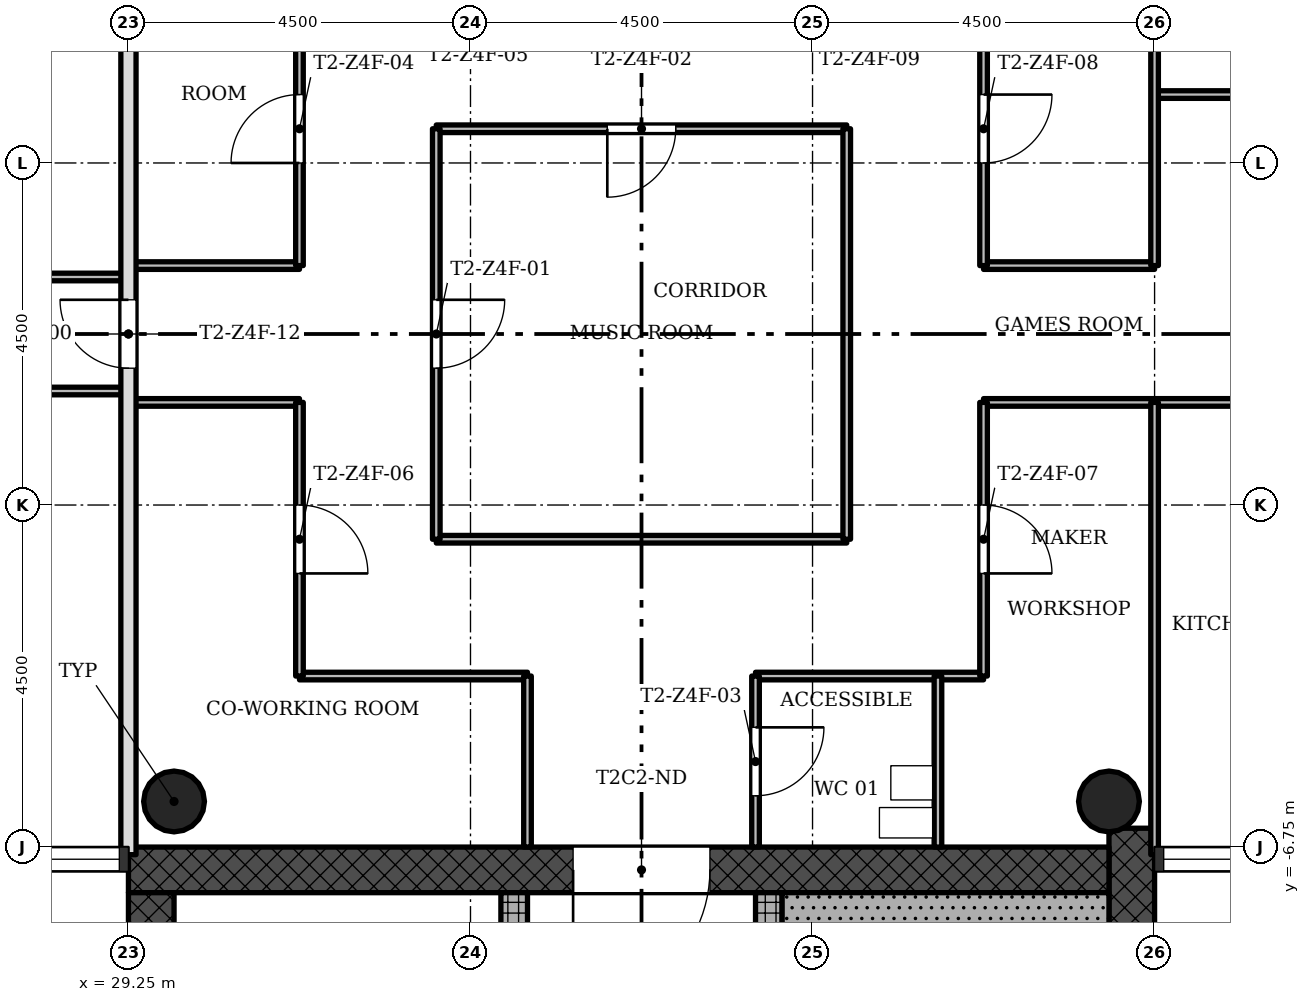
"""IFC4 building model, lengths in metres.
Left out: names, types, materials, properties, quantities, classifications, styles, units other than length and angle.
Written with IfcOpenShell. Run it as: python <this file> out.ifc"""

import sys

from ifc_helpers import new_model, si_unit, direction, frame, frame_2d, origin, origin_2d, place, context, subcontext, project, spatial, rectangle, hollow_circle, extrude, element, fill, save


model = new_model("IFC4")
c1 = context("Model", 3, precision=1e-05, world=origin(), true_north=direction((0.0, 1.0)))
c2 = subcontext(c1, "Body", "Model", "MODEL_VIEW")
j1 = project(units=[si_unit("LENGTHUNIT", "METRE"), si_unit("PLANEANGLEUNIT", "RADIAN")], contexts=[c1])
p1 = place(None, origin())
s1 = spatial("IfcSite", under=j1, at=p1, CompositionType="ELEMENT")
p2 = place(p1, origin())
s2 = spatial("IfcBuilding", under=s1, at=p2, CompositionType="ELEMENT")
p3 = place(p2, frame((0.0, 0.0, 216.4)))
s3 = spatial("IfcBuildingStorey", under=s2, at=p3, CompositionType="ELEMENT", Elevation=216.4)
p4 = place(p3, frame((42.45, -15.15, 0.0), z_axis=(0.0, 0.0, 1.0), x_axis=(0.0, 1.0, 0.0)))
e1 = element("IfcWall", 1, at=p4, inside=s3, PredefinedType="SHEAR", context=c2, shape_type="SweptSolid", body=[
    extrude(rectangle(XDim=8.648, YDim=0.6, at=frame_2d((4.324, 0.0))), origin(), (0.0, 0.0, 1.0), 3.4),
])
p5 = place(p3, frame((42.15, -7.05, 0.0), z_axis=(0.0, 0.0, 1.0), x_axis=(-1.0, 0.0, 0.0)))
e2 = element("IfcWall", 2, at=p5, inside=s3, PredefinedType="SHEAR", context=c2, shape_type="SweptSolid", body=[
    extrude(rectangle(XDim=12.9, YDim=0.6, at=frame_2d((6.45, 0.0))), origin(), (0.0, 0.0, 1.0), 3.4),
])
p6 = place(p5, frame((5.25, 0.0, 0.0)))
e3 = element("IfcOpeningElement", 3, at=p6, cuts=e2, PredefinedType="OPENING", context=c2, shape_type="SweptSolid", body=[
    extrude(rectangle(XDim=1.8, YDim=2.1, at=frame_2d((0.9, 1.05))), frame((0.0, 0.31, 0.0), z_axis=(0.0, -1.0, 0.0), x_axis=(1.0, 0.0, 0.0)), (0.0, 0.0, 1.0), 0.62),
])
p7 = place(p3, frame((29.55, -7.35, 0.0), z_axis=(0.0, 0.0, 1.0), x_axis=(0.0, -1.0, 0.0)))
e4 = element("IfcWall", 4, at=p7, inside=s3, PredefinedType="SHEAR", context=c2, shape_type="SweptSolid", body=[
    extrude(rectangle(XDim=8.4, YDim=0.6, at=frame_2d((4.2, 0.0))), origin(), (0.0, 0.0, 1.0), 3.4),
])
p8 = place(p3, frame((34.325, -15.15, 0.0), z_axis=(0.0, 0.0, 1.0), x_axis=(0.0, 1.0, 0.0)))
e5 = element("IfcWall", 5, at=p8, inside=s3, PredefinedType="SHEAR", context=c2, shape_type="SweptSolid", body=[
    extrude(rectangle(XDim=7.8, YDim=0.35, at=frame_2d((3.9, 0.0))), origin(), (0.0, 0.0, 1.0), 3.4),
])
p9 = place(p8, frame((5.55, 0.0, 0.0)))
e6 = element("IfcOpeningElement", 6, at=p9, cuts=e5, PredefinedType="OPENING", context=c2, shape_type="SweptSolid", body=[
    extrude(rectangle(XDim=1.1, YDim=2.1, at=frame_2d((0.55, 1.05))), frame((0.0, 0.185, 0.0), z_axis=(0.0, -1.0, 0.0), x_axis=(1.0, 0.0, 0.0)), (0.0, 0.0, 1.0), 0.37),
])
p10 = place(p8, frame((1.2, 0.0, 0.0)))
e7 = element("IfcOpeningElement", 7, at=p10, cuts=e5, PredefinedType="OPENING", context=c2, shape_type="SweptSolid", body=[
    extrude(rectangle(XDim=1.1, YDim=2.1, at=frame_2d((0.55, 1.05))), frame((0.0, 0.185, 0.0), z_axis=(0.0, -1.0, 0.0), x_axis=(1.0, 0.0, 0.0)), (0.0, 0.0, 1.0), 0.37),
])
p11 = place(p8, frame((3.5, 0.0, 0.0)))
e8 = element("IfcOpeningElement", 8, at=p11, cuts=e5, PredefinedType="OPENING", context=c2, shape_type="SweptSolid", body=[
    extrude(rectangle(XDim=0.9, YDim=2.1, at=frame_2d((0.45, 1.05))), frame((0.0, 0.185, 0.0), z_axis=(0.0, -1.0, 0.0), x_axis=(1.0, 0.0, 0.0)), (0.0, 0.0, 1.0), 0.37),
])
p12 = place(p3, frame((37.675, -15.15, 0.0), z_axis=(0.0, 0.0, 1.0), x_axis=(0.0, 1.0, 0.0)))
e9 = element("IfcWall", 9, at=p12, inside=s3, PredefinedType="SHEAR", context=c2, shape_type="SweptSolid", body=[
    extrude(rectangle(XDim=7.8, YDim=0.35, at=frame_2d((3.9, 0.0))), origin(), (0.0, 0.0, 1.0), 3.4),
])
p13 = place(p12, frame((5.85, 0.0, 0.0)))
e10 = element("IfcOpeningElement", 10, at=p13, cuts=e9, PredefinedType="OPENING", context=c2, shape_type="SweptSolid", body=[
    extrude(rectangle(XDim=0.9, YDim=2.1, at=frame_2d((0.45, 1.05))), frame((0.0, 0.185, 0.0), z_axis=(0.0, -1.0, 0.0), x_axis=(1.0, 0.0, 0.0)), (0.0, 0.0, 1.0), 0.37),
])
for number, where, z_axis, x_axis in (
    (11, (42.15, -6.15, 0.0), (0.0, 0.0, 1.0), (1.0, 0.0, 0.0)),
    (12, (29.85, -6.15, 0.0), (0.0, 0.0, 1.0), (1.0, 0.0, 0.0)),
):
    element("IfcColumn", number, at=place(p3, frame(where, z_axis=z_axis, x_axis=x_axis)), inside=s3, PredefinedType="COLUMN", context=c2, shape_type="SweptSolid", body=[
        extrude(hollow_circle(Radius=0.4, WallThickness=0.028, at=origin_2d()), origin(), (0.0, 0.0, 1.0), 3.4),
    ])
for number, where, z_axis, x_axis in (
    (13, (40.5, -4.5, 0.0), (0.0, 0.0, 1.0), (-1.0, 0.0, 0.0)),
    (14, (34.5, -4.5, 0.0), (0.0, 0.0, 1.0), (-1.0, 0.0, 0.0)),
):
    element("IfcWall", number, at=place(p3, frame(where, z_axis=z_axis, x_axis=x_axis)), inside=s3, PredefinedType="PARTITIONING", context=c2, shape_type="SweptSolid", body=[
        extrude(rectangle(XDim=3.0, YDim=0.1, at=frame_2d((1.5, 0.0))), origin(), (0.0, 0.0, 1.0), 3.0),
    ])
p14 = place(p3, frame((38.7, -2.7, 0.0), z_axis=(0.0, 0.0, 1.0), x_axis=(-1.0, 0.0, 0.0)))
e15 = element("IfcWall", 15, at=p14, inside=s3, PredefinedType="PARTITIONING", context=c2, shape_type="SweptSolid", body=[
    extrude(rectangle(XDim=5.4, YDim=0.1, at=frame_2d((2.7, 0.0))), origin(), (0.0, 0.0, 1.0), 3.0),
])
p15 = place(p3, frame((44.55, -0.9, 0.0), z_axis=(0.0, 0.0, 1.0), x_axis=(-1.0, 0.0, 0.0)))
e16 = element("IfcWall", 16, at=p15, inside=s3, PredefinedType="PARTITIONING", context=c2, shape_type="SweptSolid", body=[
    extrude(rectangle(XDim=4.05, YDim=0.1, at=frame_2d((2.025, 0.0))), origin(), (0.0, 0.0, 1.0), 3.0),
])
p16 = place(p3, frame((31.5, -0.9, 0.0), z_axis=(0.0, 0.0, 1.0), x_axis=(-1.0, 0.0, 0.0)))
e17 = element("IfcWall", 17, at=p16, inside=s3, PredefinedType="PARTITIONING", context=c2, shape_type="SweptSolid", body=[
    extrude(rectangle(XDim=2.25, YDim=0.1, at=frame_2d((1.125, 0.0))), origin(), (0.0, 0.0, 1.0), 3.0),
])
p17 = place(p3, frame((29.25, -0.75, 0.0), z_axis=(0.0, 0.0, 1.0), x_axis=(-1.0, 0.0, 0.0)))
e18 = element("IfcWall", 18, at=p17, inside=s3, PredefinedType="PARTITIONING", context=c2, shape_type="SweptSolid", body=[
    extrude(rectangle(XDim=7.8, YDim=0.1, at=frame_2d((3.9, 0.0))), origin(), (0.0, 0.0, 1.0), 3.0),
])
p18 = place(p17, frame((1.8, 0.0, 0.0)))
e19 = element("IfcOpeningElement", 19, at=p18, cuts=e18, PredefinedType="OPENING", context=c2, shape_type="SweptSolid", body=[
    extrude(rectangle(XDim=0.9, YDim=2.1, at=frame_2d((0.45, 1.05))), frame((0.0, 0.06, 0.0), z_axis=(0.0, -1.0, 0.0), x_axis=(1.0, 0.0, 0.0)), (0.0, 0.0, 1.0), 0.12),
])
p19 = place(p17, frame((4.95, 0.0, 0.0)))
e20 = element("IfcOpeningElement", 20, at=p19, cuts=e18, PredefinedType="OPENING", context=c2, shape_type="SweptSolid", body=[
    extrude(rectangle(XDim=0.9, YDim=2.1, at=frame_2d((0.45, 1.05))), frame((0.0, 0.06, 0.0), z_axis=(0.0, -1.0, 0.0), x_axis=(1.0, 0.0, 0.0)), (0.0, 0.0, 1.0), 0.12),
])
p20 = place(p17, frame((6.6, 0.0, 0.0)))
e21 = element("IfcOpeningElement", 21, at=p20, cuts=e18, PredefinedType="OPENING", context=c2, shape_type="SweptSolid", body=[
    extrude(rectangle(XDim=0.9, YDim=2.1, at=frame_2d((0.45, 1.05))), frame((0.0, 0.06, 0.0), z_axis=(0.0, -1.0, 0.0), x_axis=(1.0, 0.0, 0.0)), (0.0, 0.0, 1.0), 0.12),
])
p21 = place(p3, frame((29.25, 0.75, 0.0), z_axis=(0.0, 0.0, 1.0), x_axis=(-1.0, 0.0, 0.0)))
e22 = element("IfcWall", 22, at=p21, inside=s3, PredefinedType="PARTITIONING", context=c2, shape_type="SweptSolid", body=[
    extrude(rectangle(XDim=4.5, YDim=0.1, at=frame_2d((2.25, 0.0))), origin(), (0.0, 0.0, 1.0), 3.0),
])
p22 = place(p21, frame((1.8, 0.0, 0.0)))
e23 = element("IfcOpeningElement", 23, at=p22, cuts=e22, PredefinedType="OPENING", context=c2, shape_type="SweptSolid", body=[
    extrude(rectangle(XDim=0.9, YDim=2.1, at=frame_2d((0.45, 1.05))), frame((0.0, 0.06, 0.0), z_axis=(0.0, -1.0, 0.0), x_axis=(1.0, 0.0, 0.0)), (0.0, 0.0, 1.0), 0.12),
])
for number, where, z_axis, x_axis in (
    (24, (42.75, 0.9, 0.0), (0.0, 0.0, 1.0), (-1.0, 0.0, 0.0)),
    (25, (31.5, 0.9, 0.0), (0.0, 0.0, 1.0), (-1.0, 0.0, 0.0)),
):
    element("IfcWall", number, at=place(p3, frame(where, z_axis=z_axis, x_axis=x_axis)), inside=s3, PredefinedType="PARTITIONING", context=c2, shape_type="SweptSolid", body=[
        extrude(rectangle(XDim=2.25, YDim=0.1, at=frame_2d((1.125, 0.0))), origin(), (0.0, 0.0, 1.0), 3.0),
    ])
p23 = place(p3, frame((38.7, 2.7, 0.0), z_axis=(0.0, 0.0, 1.0), x_axis=(-1.0, 0.0, 0.0)))
e26 = element("IfcWall", 26, at=p23, inside=s3, PredefinedType="PARTITIONING", context=c2, shape_type="SweptSolid", body=[
    extrude(rectangle(XDim=5.4, YDim=0.1, at=frame_2d((2.7, 0.0))), origin(), (0.0, 0.0, 1.0), 3.0),
])
p24 = place(p23, frame((2.25, 0.0, 0.0)))
e27 = element("IfcOpeningElement", 27, at=p24, cuts=e26, PredefinedType="OPENING", context=c2, shape_type="SweptSolid", body=[
    extrude(rectangle(XDim=0.9, YDim=2.1, at=frame_2d((0.45, 1.05))), frame((0.0, 0.06, 0.0), z_axis=(0.0, -1.0, 0.0), x_axis=(1.0, 0.0, 0.0)), (0.0, 0.0, 1.0), 0.12),
])
p25 = place(p3, frame((47.25, 3.15, 0.0), z_axis=(0.0, 0.0, 1.0), x_axis=(-1.0, 0.0, 0.0)))
e28 = element("IfcWall", 28, at=p25, inside=s3, PredefinedType="PARTITIONING", context=c2, shape_type="SweptSolid", body=[
    extrude(rectangle(XDim=4.5, YDim=0.1, at=frame_2d((2.25, 0.0))), origin(), (0.0, 0.0, 1.0), 3.0),
])
p26 = place(p25, frame((1.8, 0.0, 0.0)))
e29 = element("IfcOpeningElement", 29, at=p26, cuts=e28, PredefinedType="OPENING", context=c2, shape_type="SweptSolid", body=[
    extrude(rectangle(XDim=0.9, YDim=2.1, at=frame_2d((0.45, 1.05))), frame((0.0, 0.06, 0.0), z_axis=(0.0, -1.0, 0.0), x_axis=(1.0, 0.0, 0.0)), (0.0, 0.0, 1.0), 0.12),
])
for number, where, z_axis, x_axis in (
    (30, (42.75, -6.85, 0.0), (0.0, 0.0, 1.0), (0.0, 1.0, 0.0)),
    (31, (42.75, 0.9, 0.0), (0.0, 0.0, 1.0), (0.0, 1.0, 0.0)),
):
    element("IfcWall", number, at=place(p3, frame(where, z_axis=z_axis, x_axis=x_axis)), inside=s3, PredefinedType="PARTITIONING", context=c2, shape_type="SweptSolid", body=[
        extrude(rectangle(XDim=5.95, YDim=0.1, at=frame_2d((2.975, 0.0))), origin(), (0.0, 0.0, 1.0), 3.0),
    ])
p27 = place(p3, frame((40.5, -4.5, 0.0), z_axis=(0.0, 0.0, 1.0), x_axis=(0.0, 1.0, 0.0)))
e32 = element("IfcWall", 32, at=p27, inside=s3, PredefinedType="PARTITIONING", context=c2, shape_type="SweptSolid", body=[
    extrude(rectangle(XDim=3.6, YDim=0.1, at=frame_2d((1.8, 0.0))), origin(), (0.0, 0.0, 1.0), 3.0),
])
p28 = place(p27, frame((1.35, 0.0, 0.0)))
e33 = element("IfcOpeningElement", 33, at=p28, cuts=e32, PredefinedType="OPENING", context=c2, shape_type="SweptSolid", body=[
    extrude(rectangle(XDim=0.9, YDim=2.1, at=frame_2d((0.45, 1.05))), frame((0.0, 0.06, 0.0), z_axis=(0.0, -1.0, 0.0), x_axis=(1.0, 0.0, 0.0)), (0.0, 0.0, 1.0), 0.12),
])
p29 = place(p3, frame((40.5, 0.9, 0.0), z_axis=(0.0, 0.0, 1.0), x_axis=(0.0, 1.0, 0.0)))
e34 = element("IfcWall", 34, at=p29, inside=s3, PredefinedType="PARTITIONING", context=c2, shape_type="SweptSolid", body=[
    extrude(rectangle(XDim=3.6, YDim=0.1, at=frame_2d((1.8, 0.0))), origin(), (0.0, 0.0, 1.0), 3.0),
])
p30 = place(p29, frame((1.35, 0.0, 0.0)))
e35 = element("IfcOpeningElement", 35, at=p30, cuts=e34, PredefinedType="OPENING", context=c2, shape_type="SweptSolid", body=[
    extrude(rectangle(XDim=0.9, YDim=2.1, at=frame_2d((0.45, 1.05))), frame((0.0, 0.06, 0.0), z_axis=(0.0, -1.0, 0.0), x_axis=(1.0, 0.0, 0.0)), (0.0, 0.0, 1.0), 0.12),
])
p31 = place(p3, frame((39.9, -6.75, 0.0), z_axis=(0.0, 0.0, 1.0), x_axis=(0.0, 1.0, 0.0)))
e36 = element("IfcWall", 36, at=p31, inside=s3, PredefinedType="PARTITIONING", context=c2, shape_type="SweptSolid", body=[
    extrude(rectangle(XDim=2.25, YDim=0.1, at=frame_2d((1.125, 0.0))), origin(), (0.0, 0.0, 1.0), 3.0),
])
p32 = place(p3, frame((38.7, -2.7, 0.0), z_axis=(0.0, 0.0, 1.0), x_axis=(0.0, 1.0, 0.0)))
e37 = element("IfcWall", 37, at=p32, inside=s3, PredefinedType="PARTITIONING", context=c2, shape_type="SweptSolid", body=[
    extrude(rectangle(XDim=5.4, YDim=0.1, at=frame_2d((2.7, 0.0))), origin(), (0.0, 0.0, 1.0), 3.0),
])
p33 = place(p3, frame((37.5, -6.75, 0.0), z_axis=(0.0, 0.0, 1.0), x_axis=(0.0, 1.0, 0.0)))
e38 = element("IfcWall", 38, at=p33, inside=s3, PredefinedType="PARTITIONING", context=c2, shape_type="SweptSolid", body=[
    extrude(rectangle(XDim=2.25, YDim=0.1, at=frame_2d((1.125, 0.0))), origin(), (0.0, 0.0, 1.0), 3.0),
])
p34 = place(p33, frame((0.675, 0.0, 0.0)))
e39 = element("IfcOpeningElement", 39, at=p34, cuts=e38, PredefinedType="OPENING", context=c2, shape_type="SweptSolid", body=[
    extrude(rectangle(XDim=0.9, YDim=2.1, at=frame_2d((0.45, 1.05))), frame((0.0, 0.06, 0.0), z_axis=(0.0, -1.0, 0.0), x_axis=(1.0, 0.0, 0.0)), (0.0, 0.0, 1.0), 0.12),
])
p35 = place(p3, frame((34.5, -6.75, 0.0), z_axis=(0.0, 0.0, 1.0), x_axis=(0.0, 1.0, 0.0)))
e40 = element("IfcWall", 40, at=p35, inside=s3, PredefinedType="PARTITIONING", context=c2, shape_type="SweptSolid", body=[
    extrude(rectangle(XDim=2.25, YDim=0.1, at=frame_2d((1.125, 0.0))), origin(), (0.0, 0.0, 1.0), 3.0),
])
p36 = place(p3, frame((33.3, -2.7, 0.0), z_axis=(0.0, 0.0, 1.0), x_axis=(0.0, 1.0, 0.0)))
e41 = element("IfcWall", 41, at=p36, inside=s3, PredefinedType="PARTITIONING", context=c2, shape_type="SweptSolid", body=[
    extrude(rectangle(XDim=5.4, YDim=0.1, at=frame_2d((2.7, 0.0))), origin(), (0.0, 0.0, 1.0), 3.0),
])
p37 = place(p36, frame((2.25, 0.0, 0.0)))
e42 = element("IfcOpeningElement", 42, at=p37, cuts=e41, PredefinedType="OPENING", context=c2, shape_type="SweptSolid", body=[
    extrude(rectangle(XDim=0.9, YDim=2.1, at=frame_2d((0.45, 1.05))), frame((0.0, 0.06, 0.0), z_axis=(0.0, -1.0, 0.0), x_axis=(1.0, 0.0, 0.0)), (0.0, 0.0, 1.0), 0.12),
])
p38 = place(p3, frame((31.5, -4.5, 0.0), z_axis=(0.0, 0.0, 1.0), x_axis=(0.0, 1.0, 0.0)))
e43 = element("IfcWall", 43, at=p38, inside=s3, PredefinedType="PARTITIONING", context=c2, shape_type="SweptSolid", body=[
    extrude(rectangle(XDim=3.6, YDim=0.1, at=frame_2d((1.8, 0.0))), origin(), (0.0, 0.0, 1.0), 3.0),
])
p39 = place(p38, frame((1.35, 0.0, 0.0)))
e44 = element("IfcOpeningElement", 44, at=p39, cuts=e43, PredefinedType="OPENING", context=c2, shape_type="SweptSolid", body=[
    extrude(rectangle(XDim=0.9, YDim=2.1, at=frame_2d((0.45, 1.05))), frame((0.0, 0.06, 0.0), z_axis=(0.0, -1.0, 0.0), x_axis=(1.0, 0.0, 0.0)), (0.0, 0.0, 1.0), 0.12),
])
p40 = place(p3, frame((31.5, 0.9, 0.0), z_axis=(0.0, 0.0, 1.0), x_axis=(0.0, 1.0, 0.0)))
e45 = element("IfcWall", 45, at=p40, inside=s3, PredefinedType="PARTITIONING", context=c2, shape_type="SweptSolid", body=[
    extrude(rectangle(XDim=5.85, YDim=0.1, at=frame_2d((2.925, 0.0))), origin(), (0.0, 0.0, 1.0), 3.0),
])
p41 = place(p40, frame((1.35, 0.0, 0.0)))
e46 = element("IfcOpeningElement", 46, at=p41, cuts=e45, PredefinedType="OPENING", context=c2, shape_type="SweptSolid", body=[
    extrude(rectangle(XDim=0.9, YDim=2.1, at=frame_2d((0.45, 1.05))), frame((0.0, 0.06, 0.0), z_axis=(0.0, -1.0, 0.0), x_axis=(1.0, 0.0, 0.0)), (0.0, 0.0, 1.0), 0.12),
])
p42 = place(p3, frame((29.25, -6.85, 0.0), z_axis=(0.0, 0.0, 1.0), x_axis=(0.0, 1.0, 0.0)))
e47 = element("IfcWall", 47, at=p42, inside=s3, PredefinedType="SOLIDWALL", context=c2, shape_type="SweptSolid", body=[
    extrude(rectangle(XDim=13.7, YDim=0.2, at=frame_2d((6.85, 0.0))), origin(), (0.0, 0.0, 1.0), 3.0),
])
p43 = place(p42, frame((6.4, 0.0, 0.0)))
e48 = element("IfcOpeningElement", 48, at=p43, cuts=e47, PredefinedType="OPENING", context=c2, shape_type="SweptSolid", body=[
    extrude(rectangle(XDim=0.9, YDim=2.1, at=frame_2d((0.45, 1.05))), frame((0.0, 0.11, 0.0), z_axis=(0.0, -1.0, 0.0), x_axis=(1.0, 0.0, 0.0)), (0.0, 0.0, 1.0), 0.22),
])
p44 = place(p3, frame((37.85, -7.65, 0.0), z_axis=(0.0, 0.0, 1.0), x_axis=(1.0, 0.0, 0.0)))
e49 = element("IfcWall", 49, at=p44, inside=s3, PredefinedType="SHEAR", context=c2, shape_type="SweptSolid", body=[
    extrude(rectangle(XDim=4.3, YDim=0.6, at=frame_2d((2.15, 0.0))), origin(), (0.0, 0.0, 1.0), 3.4),
])
p45 = place(p37, origin())
e50 = element("IfcDoor", 50, at=p45, inside=s3, OperationType="SINGLE_SWING_RIGHT", PredefinedType="DOOR", context=c2, shape_type="SweptSolid", body=[
    extrude(rectangle(XDim=0.9, YDim=2.1, at=frame_2d((0.45, 1.05))), frame((0.0, 0.025, 0.0), z_axis=(0.0, -1.0, 0.0), x_axis=(1.0, 0.0, 0.0)), (0.0, 0.0, 1.0), 0.05),
])
fill(e42, e50)
p46 = place(p24, origin())
e51 = element("IfcDoor", 51, at=p46, inside=s3, OperationType="SINGLE_SWING_LEFT", PredefinedType="DOOR", context=c2, shape_type="SweptSolid", body=[
    extrude(rectangle(XDim=0.9, YDim=2.1, at=frame_2d((0.45, 1.05))), frame((0.0, 0.025, 0.0), z_axis=(0.0, -1.0, 0.0), x_axis=(1.0, 0.0, 0.0)), (0.0, 0.0, 1.0), 0.05),
])
fill(e27, e51)
p47 = place(p34, origin())
e52 = element("IfcDoor", 52, at=p47, inside=s3, OperationType="SINGLE_SWING_RIGHT", PredefinedType="DOOR", context=c2, shape_type="SweptSolid", body=[
    extrude(rectangle(XDim=0.9, YDim=2.1, at=frame_2d((0.45, 1.05))), frame((0.0, 0.025, 0.0), z_axis=(0.0, -1.0, 0.0), x_axis=(1.0, 0.0, 0.0)), (0.0, 0.0, 1.0), 0.05),
])
fill(e39, e52)
p48 = place(p41, origin())
e53 = element("IfcDoor", 53, at=p48, inside=s3, OperationType="SINGLE_SWING_RIGHT", PredefinedType="DOOR", context=c2, shape_type="SweptSolid", body=[
    extrude(rectangle(XDim=0.9, YDim=2.1, at=frame_2d((0.45, 1.05))), frame((0.0, 0.025, 0.0), z_axis=(0.0, -1.0, 0.0), x_axis=(1.0, 0.0, 0.0)), (0.0, 0.0, 1.0), 0.05),
])
fill(e46, e53)
p49 = place(p39, origin())
e54 = element("IfcDoor", 54, at=p49, inside=s3, OperationType="SINGLE_SWING_LEFT", PredefinedType="DOOR", context=c2, shape_type="SweptSolid", body=[
    extrude(rectangle(XDim=0.9, YDim=2.1, at=frame_2d((0.45, 1.05))), frame((0.0, 0.025, 0.0), z_axis=(0.0, -1.0, 0.0), x_axis=(1.0, 0.0, 0.0)), (0.0, 0.0, 1.0), 0.05),
])
fill(e44, e54)
p50 = place(p28, origin())
e55 = element("IfcDoor", 55, at=p50, inside=s3, OperationType="SINGLE_SWING_LEFT", PredefinedType="DOOR", context=c2, shape_type="SweptSolid", body=[
    extrude(rectangle(XDim=0.9, YDim=2.1, at=frame_2d((0.45, 1.05))), frame((0.0, 0.025, 0.0), z_axis=(0.0, -1.0, 0.0), x_axis=(1.0, 0.0, 0.0)), (0.0, 0.0, 1.0), 0.05),
])
fill(e33, e55)
p51 = place(p30, origin())
e56 = element("IfcDoor", 56, at=p51, inside=s3, OperationType="SINGLE_SWING_RIGHT", PredefinedType="DOOR", context=c2, shape_type="SweptSolid", body=[
    extrude(rectangle(XDim=0.9, YDim=2.1, at=frame_2d((0.45, 1.05))), frame((0.0, 0.025, 0.0), z_axis=(0.0, -1.0, 0.0), x_axis=(1.0, 0.0, 0.0)), (0.0, 0.0, 1.0), 0.05),
])
fill(e35, e56)
p52 = place(p43, origin())
e57 = element("IfcDoor", 57, at=p52, inside=s3, OperationType="SINGLE_SWING_LEFT", PredefinedType="DOOR", context=c2, shape_type="SweptSolid", body=[
    extrude(rectangle(XDim=0.9, YDim=2.1, at=frame_2d((0.45, 1.05))), frame((0.0, 0.025, 0.0), z_axis=(0.0, -1.0, 0.0), x_axis=(1.0, 0.0, 0.0)), (0.0, 0.0, 1.0), 0.05),
])
fill(e48, e57)
p53 = place(p6, origin())
e58 = element("IfcDoor", 58, at=p53, inside=s3, OperationType="SINGLE_SWING_LEFT", PredefinedType="DOOR", context=c2, shape_type="SweptSolid", body=[
    extrude(rectangle(XDim=1.8, YDim=2.1, at=frame_2d((0.9, 1.05))), frame((0.0, 0.025, 0.0), z_axis=(0.0, -1.0, 0.0), x_axis=(1.0, 0.0, 0.0)), (0.0, 0.0, 1.0), 0.05),
])
fill(e3, e58)
save(model, sys.argv[1])
